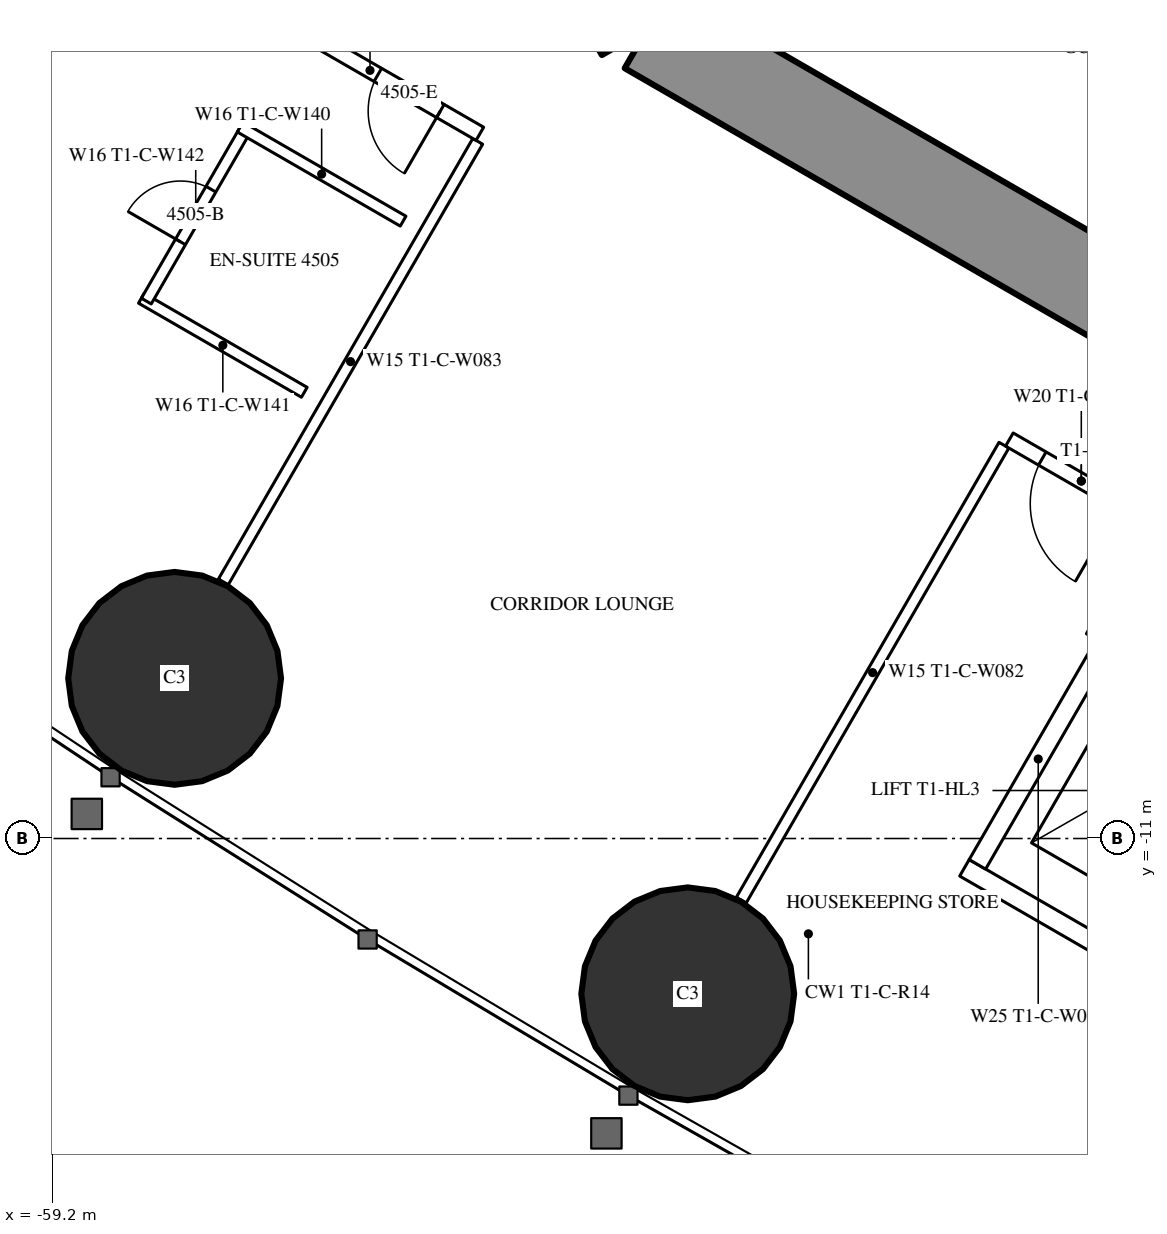
"""IFC4 building model, lengths in metres.
Left out: names, types, materials, properties, quantities, classifications, styles, units other than length and angle.
Written with IfcOpenShell. Run it as: python <this file> out.ifc"""

import sys

from ifc_helpers import new_model, si_unit, direction, frame, frame_2d, origin, origin_2d, place, context, subcontext, project, spatial, rectangle, circle, extrude, element, fill, save


model = new_model("IFC4")
c1 = context("Model", 3, precision=1e-05, world=origin(), true_north=direction((0.0, 1.0)))
c2 = subcontext(c1, "Body", "Model", "MODEL_VIEW")
j1 = project(units=[si_unit("LENGTHUNIT", "METRE"), si_unit("PLANEANGLEUNIT", "RADIAN")], contexts=[c1])
p1 = place(None, origin())
s1 = spatial("IfcSite", under=j1, at=p1, CompositionType="ELEMENT")
p2 = place(p1, origin())
s2 = spatial("IfcBuilding", under=s1, at=p2, CompositionType="ELEMENT")
p3 = place(p2, frame((0.0, 0.0, 170.3)))
s3 = spatial("IfcBuildingStorey", under=s2, at=p3, CompositionType="ELEMENT", Elevation=170.3)
for number, where, z_axis, x_axis in (
    (1, (-57.59, -8.893, 0.0), (0.0, 0.0, 1.0), (1.0, 0.0, 0.0)),
    (2, (-50.839, -13.043, 0.0), (0.0, 0.0, 1.0), (1.0, 0.0, 0.0)),
):
    element("IfcColumn", number, at=place(p3, frame(where, z_axis=z_axis, x_axis=x_axis)), inside=s3, PredefinedType="COLUMN", context=c2, shape_type="SweptSolid", body=[
        extrude(circle(Radius=1.4, at=origin_2d()), origin(), (0.0, 0.0, 1.0), 3.5),
    ])
p4 = place(p3, frame((-27.2, 14.3, 0.0), z_axis=(0.0, 0.0, 1.0), x_axis=(-0.866026593062, -0.499997940104, 0.0)))
e3 = element("IfcWall", 3, at=p4, inside=s3, PredefinedType="SHEAR", context=c2, shape_type="SweptSolid", body=[
    extrude(rectangle(XDim=28.946, YDim=1.2, at=frame_2d((14.473, 0.0))), origin(), (0.0, 0.0, 1.0), 3.5),
])
p5 = place(p4, frame((4.6, 0.0, 0.0)))
e4 = element("IfcOpeningElement", 4, at=p5, cuts=e3, PredefinedType="OPENING", context=c2, shape_type="SweptSolid", body=[
    extrude(rectangle(XDim=1.0, YDim=2.2, at=frame_2d((0.5, 1.1))), frame((0.0, 0.61, 0.0), z_axis=(0.0, -1.0, 0.0), x_axis=(1.0, 0.0, 0.0)), (0.0, 0.0, 1.0), 1.22),
])
p6 = place(p4, frame((13.395, 0.0, 0.0)))
e5 = element("IfcOpeningElement", 5, at=p6, cuts=e3, PredefinedType="OPENING", context=c2, shape_type="SweptSolid", body=[
    extrude(rectangle(XDim=1.8, YDim=2.2, at=frame_2d((0.9, 1.1))), frame((0.0, 0.61, 0.0), z_axis=(0.0, -1.0, 0.0), x_axis=(1.0, 0.0, 0.0)), (0.0, 0.0, 1.0), 1.22),
])
p7 = place(p3, frame((-27.2, -14.3, 0.0), z_axis=(0.0, 0.0, 1.0), x_axis=(-0.866024021859, 0.500002393557, 0.0)))
e6 = element("IfcWall", 6, at=p7, inside=s3, PredefinedType="SHEAR", context=c2, shape_type="SweptSolid", body=[
    extrude(rectangle(XDim=27.907, YDim=1.2, at=frame_2d((13.954, 0.0))), origin(), (0.0, 0.0, 1.0), 3.5),
])
p8 = place(p7, frame((4.6, 0.0, 0.0)))
e7 = element("IfcOpeningElement", 7, at=p8, cuts=e6, PredefinedType="OPENING", context=c2, shape_type="SweptSolid", body=[
    extrude(rectangle(XDim=1.0, YDim=2.2, at=frame_2d((0.5, 1.1))), frame((0.0, 0.61, 0.0), z_axis=(0.0, -1.0, 0.0), x_axis=(1.0, 0.0, 0.0)), (0.0, 0.0, 1.0), 1.22),
])
p9 = place(p7, frame((13.395, 0.0, 0.0)))
e8 = element("IfcOpeningElement", 8, at=p9, cuts=e6, PredefinedType="OPENING", context=c2, shape_type="SweptSolid", body=[
    extrude(rectangle(XDim=1.8, YDim=2.2, at=frame_2d((0.9, 1.1))), frame((0.0, 0.61, 0.0), z_axis=(0.0, -1.0, 0.0), x_axis=(1.0, 0.0, 0.0)), (0.0, 0.0, 1.0), 1.22),
])
p10 = place(p3, frame((-46.679, -5.825, 0.0), z_axis=(0.0, 0.0, 1.0), x_axis=(-0.500006839597, -0.866021454905, 0.0)))
e9 = element("IfcWall", 9, at=p10, inside=s3, PredefinedType="PARTITIONING", context=c2, shape_type="SweptSolid", body=[
    extrude(rectangle(XDim=6.911, YDim=0.15, at=frame_2d((3.456, 0.0))), origin(), (0.0, 0.0, 1.0), 2.3),
])
p11 = place(p3, frame((-53.602, -1.828, 0.0), z_axis=(0.0, 0.0, 1.0), x_axis=(-0.49999191814, -0.866030069798, 0.0)))
e10 = element("IfcWall", 10, at=p11, inside=s3, PredefinedType="PARTITIONING", context=c2, shape_type="SweptSolid", body=[
    extrude(rectangle(XDim=6.692, YDim=0.15, at=frame_2d((3.346, 0.0))), origin(), (0.0, 0.0, 1.0), 2.3),
])
p12 = place(p3, frame((-44.652, -6.764, 0.0), z_axis=(0.0, 0.0, 1.0), x_axis=(-0.485424724123, -0.874278466629, 0.0)))
e11 = element("IfcWall", 11, at=p12, inside=s3, PredefinedType="PARTITIONING", context=c2, shape_type="SweptSolid", body=[
    extrude(rectangle(XDim=1.805, YDim=0.15, at=frame_2d((0.903, 0.0))), origin(), (0.0, 0.0, 1.0), 3.25),
])
p13 = place(p3, frame((-44.715, -6.844, 0.0), z_axis=(0.0, 0.0, 1.0), x_axis=(-0.865999496279, 0.500044870432, 0.0)))
e12 = element("IfcWall", 12, at=p13, inside=s3, PredefinedType="PARTITIONING", context=c2, shape_type="SweptSolid", body=[
    extrude(rectangle(XDim=2.185, YDim=0.2, at=frame_2d((1.092, 0.0))), origin(), (0.0, 0.0, 1.0), 3.25),
])
p14 = place(p13, frame((0.5, 0.0, 0.0)))
e13 = element("IfcOpeningElement", 13, at=p14, cuts=e12, PredefinedType="OPENING", context=c2, shape_type="SweptSolid", body=[
    extrude(rectangle(XDim=1.185, YDim=2.2, at=frame_2d((0.593, 1.1))), frame((0.0, 0.11, 0.0), z_axis=(0.0, -1.0, 0.0), x_axis=(1.0, 0.0, 0.0)), (0.0, 0.0, 1.0), 0.22),
])
p15 = place(p3, frame((-53.574, -1.729, 0.0), z_axis=(0.0, 0.0, 1.0), x_axis=(-0.866019930389, 0.500009480079, 0.0)))
e14 = element("IfcWall", 14, at=p15, inside=s3, PredefinedType="PARTITIONING", context=c2, shape_type="SweptSolid", body=[
    extrude(rectangle(XDim=3.338, YDim=0.2, at=frame_2d((1.669, 0.0))), origin(), (0.0, 0.0, 1.0), 3.25),
])
p16 = place(p15, frame((0.6, 0.0, 0.0)))
e15 = element("IfcOpeningElement", 15, at=p16, cuts=e14, PredefinedType="OPENING", context=c2, shape_type="SweptSolid", body=[
    extrude(rectangle(XDim=0.95, YDim=2.2, at=frame_2d((0.475, 1.1))), frame((0.0, 0.11, 0.0), z_axis=(0.0, -1.0, 0.0), x_axis=(1.0, 0.0, 0.0)), (0.0, 0.0, 1.0), 0.22),
])
p17 = place(p3, frame((-55.884, -5.13, 0.0), z_axis=(0.0, 0.0, 1.0), x_axis=(-0.866006523861, 0.500032699561, 0.0)))
e16 = element("IfcWall", 16, at=p17, inside=s3, PredefinedType="PARTITIONING", context=c2, shape_type="SweptSolid", body=[
    extrude(rectangle(XDim=2.475, YDim=0.15, at=frame_2d((1.237, 0.0))), origin(), (0.0, 0.0, 1.0), 3.25),
])
p18 = place(p3, frame((-56.662, -1.678, 0.0), z_axis=(0.0, 0.0, 1.0), x_axis=(-0.500006934395, -0.866021400173, 0.0)))
e17 = element("IfcWall", 17, at=p18, inside=s3, PredefinedType="PARTITIONING", context=c2, shape_type="SweptSolid", body=[
    extrude(rectangle(XDim=2.6, YDim=0.15, at=frame_2d((1.3, 0.0))), origin(), (0.0, 0.0, 1.0), 3.25),
])
p19 = place(p18, frame((0.9, 0.0, 0.0)))
e18 = element("IfcOpeningElement", 18, at=p19, cuts=e17, PredefinedType="OPENING", context=c2, shape_type="SweptSolid", body=[
    extrude(rectangle(XDim=0.8, YDim=2.2, at=frame_2d((0.4, 1.1))), frame((0.0, 0.085, 0.0), z_axis=(0.0, -1.0, 0.0), x_axis=(1.0, 0.0, 0.0)), (0.0, 0.0, 1.0), 0.17),
])
p20 = place(p3, frame((-54.583, -2.878, 0.0), z_axis=(0.0, 0.0, 1.0), x_axis=(-0.866006523861, 0.500032699561, 0.0)))
e19 = element("IfcWall", 19, at=p20, inside=s3, PredefinedType="PARTITIONING", context=c2, shape_type="SweptSolid", body=[
    extrude(rectangle(XDim=2.475, YDim=0.15, at=frame_2d((1.237, 0.0))), origin(), (0.0, 0.0, 1.0), 3.25),
])
p21 = place(p3, frame((-41.482, -14.686, 0.0), z_axis=(0.0, 0.0, 1.0), x_axis=(-0.86603344179, 0.499986077507, 0.0)))
e20 = element("IfcWall", 20, at=p21, inside=s3, PredefinedType="PARTITIONING", context=c2, shape_type="SweptSolid", body=[
    extrude(rectangle(XDim=6.6, YDim=0.25, at=frame_2d((3.3, 0.0))), origin(), (0.0, 0.0, 1.0), 3.25),
])
p22 = place(p3, frame((-45.428, -8.568, 0.0), z_axis=(0.0, 0.0, 1.0), x_axis=(-0.499929347863, -0.866066190972, 0.0)))
e21 = element("IfcWall", 21, at=p22, inside=s3, PredefinedType="PARTITIONING", context=c2, shape_type="SweptSolid", body=[
    extrude(rectangle(XDim=3.201, YDim=0.25, at=frame_2d((1.6, 0.0))), origin(), (0.0, 0.0, 1.0), 3.25),
])
p23 = place(p19, origin())
e22 = element("IfcDoor", 22, at=p23, inside=s3, OperationType="SINGLE_SWING_RIGHT", PredefinedType="DOOR", context=c2, shape_type="SweptSolid", body=[
    extrude(rectangle(XDim=0.8, YDim=2.2, at=frame_2d((0.4, 1.1))), frame((0.0, 0.025, 0.0), z_axis=(0.0, -1.0, 0.0), x_axis=(1.0, 0.0, 0.0)), (0.0, 0.0, 1.0), 0.05),
])
fill(e18, e22)
p24 = place(p16, origin())
e23 = element("IfcDoor", 23, at=p24, inside=s3, OperationType="SINGLE_SWING_LEFT", PredefinedType="DOOR", context=c2, shape_type="SweptSolid", body=[
    extrude(rectangle(XDim=0.95, YDim=2.2, at=frame_2d((0.475, 1.1))), frame((0.0, 0.025, 0.0), z_axis=(0.0, -1.0, 0.0), x_axis=(1.0, 0.0, 0.0)), (0.0, 0.0, 1.0), 0.05),
])
fill(e15, e23)
p25 = place(p14, origin())
e24 = element("IfcDoor", 24, at=p25, inside=s3, OperationType="SINGLE_SWING_LEFT", PredefinedType="DOOR", context=c2, shape_type="SweptSolid", body=[
    extrude(rectangle(XDim=1.185, YDim=2.2, at=frame_2d((0.593, 1.1))), frame((0.0, 0.025, 0.0), z_axis=(0.0, -1.0, 0.0), x_axis=(1.0, 0.0, 0.0)), (0.0, 0.0, 1.0), 0.05),
])
fill(e13, e24)
save(model, sys.argv[1])
